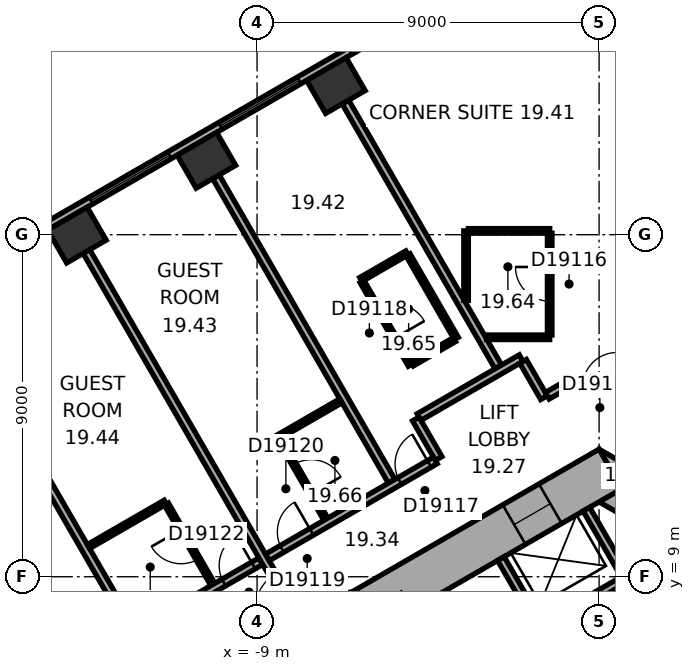
"""IFC4 building model, lengths in metres.
Left out: names, types, materials, properties, quantities, classifications, styles, units other than length and angle.
Written with IfcOpenShell. Run it as: python <this file> out.ifc"""

import sys

from ifc_helpers import new_model, si_unit, direction, frame, frame_2d, origin, origin_2d, place, context, subcontext, project, spatial, rectangle, extrude, element, fill, save


model = new_model("IFC4")
c1 = context("Model", 3, precision=1e-05, world=origin(), true_north=direction((0.0, 1.0)))
c2 = subcontext(c1, "Body", "Model", "MODEL_VIEW")
j1 = project(units=[si_unit("LENGTHUNIT", "METRE"), si_unit("PLANEANGLEUNIT", "RADIAN")], contexts=[c1])
p1 = place(None, origin())
s1 = spatial("IfcSite", under=j1, at=p1, CompositionType="ELEMENT")
p2 = place(p1, origin())
s2 = spatial("IfcBuilding", under=s1, at=p2, CompositionType="ELEMENT")
p3 = place(p2, frame((0.0, 0.0, 86.9)))
s3 = spatial("IfcBuildingStorey", under=s2, at=p3, CompositionType="ELEMENT", Elevation=86.9)
for number, where, z_axis, x_axis in (
    (1, (-6.926, 21.925, 0.0), (0.0, 0.0, 1.0), (-0.866, -0.5, 0.0)),
    (2, (-10.333, 19.957, 0.0), (0.0, 0.0, 1.0), (-0.866, -0.5, 0.0)),
    (3, (-13.74, 17.99, 0.0), (0.0, 0.0, 1.0), (-0.866, -0.5, 0.0)),
):
    element("IfcColumn", number, at=place(p3, frame(where, z_axis=z_axis, x_axis=x_axis)), inside=s3, PredefinedType="COLUMN", context=c2, shape_type="SweptSolid", body=[
        extrude(rectangle(XDim=1.2, YDim=1.0, at=origin_2d()), origin(), (0.0, 0.0, 1.0), 3.3),
    ])
p4 = place(p3, frame((10.4, 5.658, 0.0), z_axis=(0.0, 0.0, 1.0), x_axis=(-0.866021384402, 0.500006961711, 0.0)))
e4 = element("IfcWall", 4, at=p4, inside=s3, PredefinedType="SHEAR", context=c2, shape_type="SweptSolid", body=[
    extrude(rectangle(XDim=12.355, YDim=1.2, at=frame_2d((6.178, 0.0))), origin(), (0.0, 0.0, 1.0), 3.3),
])
p5 = place(p4, frame((2.728, 0.0, 0.0)))
e5 = element("IfcOpeningElement", 5, at=p5, cuts=e4, PredefinedType="OPENING", context=c2, shape_type="SweptSolid", body=[
    extrude(rectangle(XDim=1.1, YDim=2.1, at=frame_2d((0.55, 1.05))), frame((0.0, 0.61, 0.0), z_axis=(0.0, -1.0, 0.0), x_axis=(1.0, 0.0, 0.0)), (0.0, 0.0, 1.0), 1.22),
])
p6 = place(p4, frame((5.328, 0.0, 0.0)))
e6 = element("IfcOpeningElement", 6, at=p6, cuts=e4, PredefinedType="OPENING", context=c2, shape_type="SweptSolid", body=[
    extrude(rectangle(XDim=1.1, YDim=2.1, at=frame_2d((0.55, 1.05))), frame((0.0, 0.61, 0.0), z_axis=(0.0, -1.0, 0.0), x_axis=(1.0, 0.0, 0.0)), (0.0, 0.0, 1.0), 1.22),
])
p7 = place(p4, frame((7.928, 0.0, 0.0)))
e7 = element("IfcOpeningElement", 7, at=p7, cuts=e4, PredefinedType="OPENING", context=c2, shape_type="SweptSolid", body=[
    extrude(rectangle(XDim=1.1, YDim=2.1, at=frame_2d((0.55, 1.05))), frame((0.0, 0.61, 0.0), z_axis=(0.0, -1.0, 0.0), x_axis=(1.0, 0.0, 0.0)), (0.0, 0.0, 1.0), 1.22),
])
p8 = place(p3, frame((0.3, 11.836, 0.0), z_axis=(0.0, 0.0, 1.0), x_axis=(-0.866021384402, -0.500006961711, 0.0)))
e8 = element("IfcWall", 8, at=p8, inside=s3, PredefinedType="SHEAR", context=c2, shape_type="SweptSolid", body=[
    extrude(rectangle(XDim=12.355, YDim=1.2, at=frame_2d((6.178, 0.0))), origin(), (0.0, 0.0, 1.0), 3.3),
])
p9 = place(p8, frame((6.378, 0.0, 0.0)))
e9 = element("IfcOpeningElement", 9, at=p9, cuts=e8, PredefinedType="OPENING", context=c2, shape_type="SweptSolid", body=[
    extrude(rectangle(XDim=1.5, YDim=2.1, at=frame_2d((0.75, 1.05))), frame((0.0, 0.61, 0.0), z_axis=(0.0, -1.0, 0.0), x_axis=(1.0, 0.0, 0.0)), (0.0, 0.0, 1.0), 1.22),
])
p10 = place(p8, frame((1.828, 0.0, 0.0)))
e10 = element("IfcOpeningElement", 10, at=p10, cuts=e8, PredefinedType="OPENING", context=c2, shape_type="SweptSolid", body=[
    extrude(rectangle(XDim=1.1, YDim=2.1, at=frame_2d((0.55, 1.05))), frame((0.0, 0.61, 0.0), z_axis=(0.0, -1.0, 0.0), x_axis=(1.0, 0.0, 0.0)), (0.0, 0.0, 1.0), 1.22),
])
p11 = place(p3, frame((-3.136, 24.805, 0.0), z_axis=(0.0, 0.0, 1.0), x_axis=(-0.866028291626, -0.499994998079, 0.0)))
e11 = element("IfcWall", 11, at=p11, inside=s3, PredefinedType="STANDARD", context=c2, shape_type="SweptSolid", body=[
    extrude(rectangle(XDim=21.246, YDim=0.2, at=frame_2d((10.623, 0.0))), origin(), (0.0, 0.0, 1.0), 3.3),
])
p12 = place(p11, frame((1.555, 0.0, 0.8)))
e12 = element("IfcOpeningElement", 12, at=p12, cuts=e11, PredefinedType="OPENING", context=c2, shape_type="SweptSolid", body=[
    extrude(rectangle(XDim=2.4, YDim=1.7, at=frame_2d((1.2, 0.85))), frame((0.0, 0.11, 0.0), z_axis=(0.0, -1.0, 0.0), x_axis=(1.0, 0.0, 0.0)), (0.0, 0.0, 1.0), 0.22),
])
p13 = place(p11, frame((5.489, 0.0, 0.8)))
e13 = element("IfcOpeningElement", 13, at=p13, cuts=e11, PredefinedType="OPENING", context=c2, shape_type="SweptSolid", body=[
    extrude(rectangle(XDim=2.4, YDim=1.7, at=frame_2d((1.2, 0.85))), frame((0.0, 0.11, 0.0), z_axis=(0.0, -1.0, 0.0), x_axis=(1.0, 0.0, 0.0)), (0.0, 0.0, 1.0), 0.22),
])
p14 = place(p11, frame((9.424, 0.0, 0.8)))
e14 = element("IfcOpeningElement", 14, at=p14, cuts=e11, PredefinedType="OPENING", context=c2, shape_type="SweptSolid", body=[
    extrude(rectangle(XDim=2.4, YDim=1.7, at=frame_2d((1.2, 0.85))), frame((0.0, 0.11, 0.0), z_axis=(0.0, -1.0, 0.0), x_axis=(1.0, 0.0, 0.0)), (0.0, 0.0, 1.0), 0.22),
])
p15 = place(p11, frame((13.358, 0.0, 0.8)))
e15 = element("IfcOpeningElement", 15, at=p15, cuts=e11, PredefinedType="OPENING", context=c2, shape_type="SweptSolid", body=[
    extrude(rectangle(XDim=2.4, YDim=1.7, at=frame_2d((1.2, 0.85))), frame((0.0, 0.11, 0.0), z_axis=(0.0, -1.0, 0.0), x_axis=(1.0, 0.0, 0.0)), (0.0, 0.0, 1.0), 0.22),
])
p16 = place(p11, frame((17.293, 0.0, 0.8)))
e16 = element("IfcOpeningElement", 16, at=p16, cuts=e11, PredefinedType="OPENING", context=c2, shape_type="SweptSolid", body=[
    extrude(rectangle(XDim=2.4, YDim=1.7, at=frame_2d((1.2, 0.85))), frame((0.0, 0.11, 0.0), z_axis=(0.0, -1.0, 0.0), x_axis=(1.0, 0.0, 0.0)), (0.0, 0.0, 1.0), 0.22),
])
p17 = place(p3, frame((0.803, 9.009, 0.0), z_axis=(0.0, 0.0, 1.0), x_axis=(-0.866028230842, -0.499995103361, 0.0)))
e17 = element("IfcWall", 17, at=p17, inside=s3, PredefinedType="PARTITIONING", context=c2, shape_type="SweptSolid", body=[
    extrude(rectangle(XDim=5.4, YDim=0.2, at=frame_2d((2.7, 0.0))), origin(), (0.0, 0.0, 1.0), 3.05),
])
p18 = place(p3, frame((0.767, 8.872, 0.0), z_axis=(0.0, 0.0, 1.0), x_axis=(-0.499994660107, 0.866028486751, 0.0)))
e18 = element("IfcWall", 18, at=p18, inside=s3, PredefinedType="PARTITIONING", context=c2, shape_type="SweptSolid", body=[
    extrude(rectangle(XDim=2.2, YDim=0.2, at=frame_2d((1.1, 0.0))), origin(), (0.0, 0.0, 1.0), 3.05),
])
p19 = place(p3, frame((-1.485, 7.572, 0.0), z_axis=(0.0, 0.0, 1.0), x_axis=(-0.50002983664, 0.866008176907, 0.0)))
e19 = element("IfcWall", 19, at=p19, inside=s3, PredefinedType="PARTITIONING", context=c2, shape_type="SweptSolid", body=[
    extrude(rectangle(XDim=2.2, YDim=0.2, at=frame_2d((1.1, 0.0))), origin(), (0.0, 0.0, 1.0), 3.05),
])
p20 = place(p3, frame((-16.898, 15.59, 0.0), z_axis=(0.0, 0.0, 1.0), x_axis=(0.499994742786, -0.866028439017, 0.0)))
e20 = element("IfcWall", 20, at=p20, inside=s3, PredefinedType="PARTITIONING", context=c2, shape_type="SweptSolid", body=[
    extrude(rectangle(XDim=9.65, YDim=0.2, at=frame_2d((4.825, 0.0))), origin(), (0.0, 0.0, 1.0), 3.05),
])
p21 = place(p3, frame((-13.436, 9.794, 0.0), z_axis=(0.0, 0.0, 1.0), x_axis=(0.866053246676, 0.499951771596, 0.0)))
e21 = element("IfcWall", 21, at=p21, inside=s3, PredefinedType="PARTITIONING", context=c2, shape_type="SweptSolid", body=[
    extrude(rectangle(XDim=2.335, YDim=0.12, at=frame_2d((1.167, 0.0))), origin(), (0.0, 0.0, 1.0), 3.05),
])
p22 = place(p3, frame((-11.385, 10.909, 0.0), z_axis=(0.0, 0.0, 1.0), x_axis=(0.500077547548, -0.865980627057, 0.0)))
e22 = element("IfcWall", 22, at=p22, inside=s3, PredefinedType="PARTITIONING", context=c2, shape_type="SweptSolid", body=[
    extrude(rectangle(XDim=2.44, YDim=0.12, at=frame_2d((1.22, 0.0))), origin(), (0.0, 0.0, 1.0), 3.05),
])
p23 = place(p22, frame((0.77, 0.0, 0.0)))
e23 = element("IfcOpeningElement", 23, at=p23, cuts=e22, PredefinedType="OPENING", context=c2, shape_type="SweptSolid", body=[
    extrude(rectangle(XDim=0.9, YDim=2.1, at=frame_2d((0.45, 1.05))), frame((0.0, 0.07, 0.0), z_axis=(0.0, -1.0, 0.0), x_axis=(1.0, 0.0, 0.0)), (0.0, 0.0, 1.0), 0.14),
])
p24 = place(p3, frame((-10.083, 19.524, 0.0), z_axis=(0.0, 0.0, 1.0), x_axis=(0.499999662836, -0.866025598446, 0.0)))
e24 = element("IfcWall", 24, at=p24, inside=s3, PredefinedType="PARTITIONING", context=c2, shape_type="SweptSolid", body=[
    extrude(rectangle(XDim=9.25, YDim=0.2, at=frame_2d((4.625, 0.0))), origin(), (0.0, 0.0, 1.0), 2.6),
])
p25 = place(p3, frame((-8.902, 9.41, 0.0), z_axis=(0.0, 0.0, 1.0), x_axis=(-0.866014299198, -0.500019233215, 0.0)))
e25 = element("IfcWall", 25, at=p25, inside=s3, PredefinedType="PARTITIONING", context=c2, shape_type="SweptSolid", body=[
    extrude(rectangle(XDim=3.133, YDim=0.2, at=frame_2d((1.567, 0.0))), origin(), (0.0, 0.0, 1.0), 3.05),
])
p26 = place(p25, frame((0.225, 0.0, 0.0)))
e26 = element("IfcOpeningElement", 26, at=p26, cuts=e25, PredefinedType="OPENING", context=c2, shape_type="SweptSolid", body=[
    extrude(rectangle(XDim=0.9, YDim=2.1, at=frame_2d((0.45, 1.05))), frame((0.0, 0.11, 0.0), z_axis=(0.0, -1.0, 0.0), x_axis=(1.0, 0.0, 0.0)), (0.0, 0.0, 1.0), 0.22),
])
p27 = place(p3, frame((-8.44, 12.679, 0.0), z_axis=(0.0, 0.0, 1.0), x_axis=(0.866044365799, 0.499967155389, 0.0)))
e27 = element("IfcWall", 27, at=p27, inside=s3, PredefinedType="PARTITIONING", context=c2, shape_type="SweptSolid", body=[
    extrude(rectangle(XDim=1.9, YDim=0.12, at=frame_2d((0.95, 0.0))), origin(), (0.0, 0.0, 1.0), 3.05),
])
p28 = place(p3, frame((-7.865, 7.814, 0.0), z_axis=(0.0, 0.0, 1.0), x_axis=(-0.500004234368, 0.866022959057, 0.0)))
e28 = element("IfcWall", 28, at=p28, inside=s3, PredefinedType="PARTITIONING", context=c2, shape_type="SweptSolid", body=[
    extrude(rectangle(XDim=11.25, YDim=0.2, at=frame_2d((5.625, 0.0))), origin(), (0.0, 0.0, 1.0), 3.05),
])
p29 = place(p28, frame((0.5, 0.0, 0.0)))
e29 = element("IfcOpeningElement", 29, at=p29, cuts=e28, PredefinedType="OPENING", context=c2, shape_type="SweptSolid", body=[
    extrude(rectangle(XDim=0.9, YDim=2.1, at=frame_2d((0.45, 1.05))), frame((0.0, 0.11, 0.0), z_axis=(0.0, -1.0, 0.0), x_axis=(1.0, 0.0, 0.0)), (0.0, 0.0, 1.0), 0.22),
])
p30 = place(p3, frame((-7.19, 10.513, 0.0), z_axis=(0.0, 0.0, 1.0), x_axis=(-0.499959183527, 0.866048967903, 0.0)))
e30 = element("IfcWall", 30, at=p30, inside=s3, PredefinedType="PARTITIONING", context=c2, shape_type="SweptSolid", body=[
    extrude(rectangle(XDim=2.44, YDim=0.12, at=frame_2d((1.22, 0.0))), origin(), (0.0, 0.0, 1.0), 3.05),
])
p31 = place(p30, frame((0.77, 0.0, 0.0)))
e31 = element("IfcOpeningElement", 31, at=p31, cuts=e30, PredefinedType="OPENING", context=c2, shape_type="SweptSolid", body=[
    extrude(rectangle(XDim=0.9, YDim=2.1, at=frame_2d((0.45, 1.05))), frame((0.0, 0.07, 0.0), z_axis=(0.0, -1.0, 0.0), x_axis=(1.0, 0.0, 0.0)), (0.0, 0.0, 1.0), 0.14),
])
p32 = place(p3, frame((-6.676, 21.492, 0.0), z_axis=(0.0, 0.0, 1.0), x_axis=(0.500011263043, -0.866018900966, 0.0)))
e32 = element("IfcWall", 32, at=p32, inside=s3, PredefinedType="PARTITIONING", context=c2, shape_type="SweptSolid", body=[
    extrude(rectangle(XDim=8.049, YDim=0.2, at=frame_2d((4.024, 0.0))), origin(), (0.0, 0.0, 1.0), 3.05),
])
p33 = place(p3, frame((-6.268, 16.82, 0.0), z_axis=(0.0, 0.0, 1.0), x_axis=(0.866002662425, 0.500039387122, 0.0)))
e33 = element("IfcWall", 33, at=p33, inside=s3, PredefinedType="PARTITIONING", context=c2, shape_type="SweptSolid", body=[
    extrude(rectangle(XDim=1.4, YDim=0.12, at=frame_2d((0.7, 0.0))), origin(), (0.0, 0.0, 1.0), 3.05),
])
p34 = place(p3, frame((-5.026, 17.469, 0.0), z_axis=(0.0, 0.0, 1.0), x_axis=(0.500005339912, -0.866022320763, 0.0)))
e34 = element("IfcWall", 34, at=p34, inside=s3, PredefinedType="PARTITIONING", context=c2, shape_type="SweptSolid", body=[
    extrude(rectangle(XDim=2.54, YDim=0.12, at=frame_2d((1.27, 0.0))), origin(), (0.0, 0.0, 1.0), 3.05),
])
p35 = place(p3, frame((-4.968, 14.569, 0.0), z_axis=(0.0, 0.0, 1.0), x_axis=(-0.500046963369, 0.865998287773, 0.0)))
e35 = element("IfcWall", 35, at=p35, inside=s3, PredefinedType="PARTITIONING", context=c2, shape_type="SweptSolid", body=[
    extrude(rectangle(XDim=2.54, YDim=0.12, at=frame_2d((1.27, 0.0))), origin(), (0.0, 0.0, 1.0), 3.05),
])
p36 = place(p35, frame((0.82, 0.0, 0.0)))
e36 = element("IfcOpeningElement", 36, at=p36, cuts=e35, PredefinedType="OPENING", context=c2, shape_type="SweptSolid", body=[
    extrude(rectangle(XDim=0.9, YDim=2.1, at=frame_2d((0.45, 1.05))), frame((0.0, 0.07, 0.0), z_axis=(0.0, -1.0, 0.0), x_axis=(1.0, 0.0, 0.0)), (0.0, 0.0, 1.0), 0.14),
])
p37 = place(p3, frame((-4.823, 13.152, 0.0), z_axis=(0.0, 0.0, 1.0), x_axis=(0.499986357472, -0.866033280158, 0.0)))
e37 = element("IfcWall", 37, at=p37, inside=s3, PredefinedType="PARTITIONING", context=c2, shape_type="SweptSolid", body=[
    extrude(rectangle(XDim=1.201, YDim=0.2, at=frame_2d((0.601, 0.0))), origin(), (0.0, 0.0, 1.0), 3.05),
])
p38 = place(p3, frame((-4.309, 12.061, 0.0), z_axis=(0.0, 0.0, 1.0), x_axis=(-0.866020679205, -0.500008183122, 0.0)))
e38 = element("IfcWall", 38, at=p38, inside=s3, PredefinedType="PARTITIONING", context=c2, shape_type="SweptSolid", body=[
    extrude(rectangle(XDim=5.104, YDim=0.2, at=frame_2d((2.552, 0.0))), origin(), (0.0, 0.0, 1.0), 3.05),
])
p39 = place(p38, frame((0.185, 0.0, 0.0)))
e39 = element("IfcOpeningElement", 39, at=p39, cuts=e38, PredefinedType="OPENING", context=c2, shape_type="SweptSolid", body=[
    extrude(rectangle(XDim=0.9, YDim=2.1, at=frame_2d((0.45, 1.05))), frame((0.0, 0.11, 0.0), z_axis=(0.0, -1.0, 0.0), x_axis=(1.0, 0.0, 0.0)), (0.0, 0.0, 1.0), 0.22),
])
p40 = place(p38, frame((3.761, 0.0, 0.0)))
e40 = element("IfcOpeningElement", 40, at=p40, cuts=e38, PredefinedType="OPENING", context=c2, shape_type="SweptSolid", body=[
    extrude(rectangle(XDim=0.9, YDim=2.1, at=frame_2d((0.45, 1.05))), frame((0.0, 0.11, 0.0), z_axis=(0.0, -1.0, 0.0), x_axis=(1.0, 0.0, 0.0)), (0.0, 0.0, 1.0), 0.22),
])
p41 = place(p3, frame((-3.808, 15.239, 0.0), z_axis=(0.0, 0.0, 1.0), x_axis=(-0.866087136806, -0.499893060024, 0.0)))
e41 = element("IfcWall", 41, at=p41, inside=s3, PredefinedType="PARTITIONING", context=c2, shape_type="SweptSolid", body=[
    extrude(rectangle(XDim=1.28, YDim=0.12, at=frame_2d((0.64, 0.0))), origin(), (0.0, 0.0, 1.0), 3.05),
])
p42 = place(p3, frame((-3.5, 16.271, 0.0), z_axis=(0.0, 0.0, 1.0), x_axis=(0.0, 1.0, 0.0)))
e42 = element("IfcWall", 42, at=p42, inside=s3, PredefinedType="PARTITIONING", context=c2, shape_type="SweptSolid", body=[
    extrude(rectangle(XDim=1.829, YDim=0.12, at=frame_2d((0.915, 0.0))), origin(), (0.0, 0.0, 1.0), 3.05),
])
p43 = place(p3, frame((-3.44, 18.101, 0.0), z_axis=(0.0, 0.0, 1.0), x_axis=(1.0, 0.0, 0.0)))
e43 = element("IfcWall", 43, at=p43, inside=s3, PredefinedType="PARTITIONING", context=c2, shape_type="SweptSolid", body=[
    extrude(rectangle(XDim=2.14, YDim=0.12, at=frame_2d((1.07, 0.0))), origin(), (0.0, 0.0, 1.0), 3.05),
])
p44 = place(p3, frame((-2.05, 14.752, 0.0), z_axis=(0.0, 0.0, 1.0), x_axis=(-0.866030936828, -0.499990416364, 0.0)))
e44 = element("IfcWall", 44, at=p44, inside=s3, PredefinedType="PARTITIONING", context=c2, shape_type="SweptSolid", body=[
    extrude(rectangle(XDim=3.102, YDim=0.2, at=frame_2d((1.551, 0.0))), origin(), (0.0, 0.0, 1.0), 3.05),
])
p45 = place(p3, frame((-1.449, 13.712, 0.0), z_axis=(0.0, 0.0, 1.0), x_axis=(-0.499978356969, 0.866037899034, 0.0)))
e45 = element("IfcWall", 45, at=p45, inside=s3, PredefinedType="PARTITIONING", context=c2, shape_type="SweptSolid", body=[
    extrude(rectangle(XDim=1.101, YDim=0.2, at=frame_2d((0.551, 0.0))), origin(), (0.0, 0.0, 1.0), 3.05),
])
p46 = place(p3, frame((-1.3, 15.301, 0.0), z_axis=(0.0, 0.0, 1.0), x_axis=(-1.0, 0.0, 0.0)))
e46 = element("IfcWall", 46, at=p46, inside=s3, PredefinedType="PARTITIONING", context=c2, shape_type="SweptSolid", body=[
    extrude(rectangle(XDim=1.661, YDim=0.12, at=frame_2d((0.831, 0.0))), origin(), (0.0, 0.0, 1.0), 3.05),
])
p47 = place(p3, frame((-1.3, 18.041, 0.0), z_axis=(0.0, 0.0, 1.0), x_axis=(0.0, -1.0, 0.0)))
e47 = element("IfcWall", 47, at=p47, inside=s3, PredefinedType="PARTITIONING", context=c2, shape_type="SweptSolid", body=[
    extrude(rectangle(XDim=2.68, YDim=0.12, at=frame_2d((1.34, 0.0))), origin(), (0.0, 0.0, 1.0), 3.05),
])
p48 = place(p47, frame((0.89, 0.0, 0.0)))
e48 = element("IfcOpeningElement", 48, at=p48, cuts=e47, PredefinedType="OPENING", context=c2, shape_type="SweptSolid", body=[
    extrude(rectangle(XDim=0.9, YDim=2.1, at=frame_2d((0.45, 1.05))), frame((0.0, 0.07, 0.0), z_axis=(0.0, -1.0, 0.0), x_axis=(1.0, 0.0, 0.0)), (0.0, 0.0, 1.0), 0.14),
])
p49 = place(p3, frame((-0.95, 14.001, 0.0), z_axis=(0.0, 0.0, 1.0), x_axis=(-0.86609177584, -0.499885022602, 0.0)))
e49 = element("IfcWall", 49, at=p49, inside=s3, PredefinedType="PARTITIONING", context=c2, shape_type="SweptSolid", body=[
    extrude(rectangle(XDim=0.477, YDim=0.2, at=frame_2d((0.238, 0.0))), origin(), (0.0, 0.0, 1.0), 3.05),
])
p50 = place(p3, frame((0.95, 14.001, 0.0), z_axis=(0.0, 0.0, 1.0), x_axis=(-1.0, 0.0, 0.0)))
e50 = element("IfcWall", 50, at=p50, inside=s3, PredefinedType="PARTITIONING", context=c2, shape_type="SweptSolid", body=[
    extrude(rectangle(XDim=1.86, YDim=0.2, at=frame_2d((0.93, 0.0))), origin(), (0.0, 0.0, 1.0), 3.05),
])
p51 = place(p50, frame((0.48, 0.0, 0.0)))
e51 = element("IfcOpeningElement", 51, at=p51, cuts=e50, PredefinedType="OPENING", context=c2, shape_type="SweptSolid", body=[
    extrude(rectangle(XDim=0.9, YDim=2.1, at=frame_2d((0.45, 1.05))), frame((0.0, 0.11, 0.0), z_axis=(0.0, -1.0, 0.0), x_axis=(1.0, 0.0, 0.0)), (0.0, 0.0, 1.0), 0.22),
])
p52 = place(p13, origin())
e52 = element("IfcWindow", 52, at=p52, inside=s3, PartitioningType="SINGLE_PANEL", PredefinedType="WINDOW", context=c2, shape_type="SweptSolid", body=[
    extrude(rectangle(XDim=2.4, YDim=1.7, at=frame_2d((1.2, 0.85))), frame((0.0, 0.03, 0.0), z_axis=(0.0, -1.0, 0.0), x_axis=(1.0, 0.0, 0.0)), (0.0, 0.0, 1.0), 0.06),
])
fill(e13, e52)
p53 = place(p14, origin())
e53 = element("IfcWindow", 53, at=p53, inside=s3, PartitioningType="SINGLE_PANEL", PredefinedType="WINDOW", context=c2, shape_type="SweptSolid", body=[
    extrude(rectangle(XDim=2.4, YDim=1.7, at=frame_2d((1.2, 0.85))), frame((0.0, 0.03, 0.0), z_axis=(0.0, -1.0, 0.0), x_axis=(1.0, 0.0, 0.0)), (0.0, 0.0, 1.0), 0.06),
])
fill(e14, e53)
p54 = place(p9, origin())
e54 = element("IfcDoor", 54, at=p54, inside=s3, OperationType="DOUBLE_DOOR_SINGLE_SWING", PredefinedType="DOOR", context=c2, shape_type="SweptSolid", body=[
    extrude(rectangle(XDim=1.5, YDim=2.1, at=frame_2d((0.75, 1.05))), frame((0.0, 0.025, 0.0), z_axis=(0.0, -1.0, 0.0), x_axis=(1.0, 0.0, 0.0)), (0.0, 0.0, 1.0), 0.05),
])
fill(e9, e54)
p55 = place(p10, origin())
e55 = element("IfcDoor", 55, at=p55, inside=s3, OperationType="DOUBLE_DOOR_SLIDING", PredefinedType="DOOR", context=c2, shape_type="SweptSolid", body=[
    extrude(rectangle(XDim=1.1, YDim=2.1, at=frame_2d((0.55, 1.05))), frame((0.0, 0.025, 0.0), z_axis=(0.0, -1.0, 0.0), x_axis=(1.0, 0.0, 0.0)), (0.0, 0.0, 1.0), 0.05),
])
fill(e10, e55)
p56 = place(p51, origin())
e56 = element("IfcDoor", 56, at=p56, inside=s3, OperationType="SINGLE_SWING_LEFT", PredefinedType="DOOR", context=c2, shape_type="SweptSolid", body=[
    extrude(rectangle(XDim=0.9, YDim=2.1, at=frame_2d((0.45, 1.05))), frame((0.0, 0.025, 0.0), z_axis=(0.0, -1.0, 0.0), x_axis=(1.0, 0.0, 0.0)), (0.0, 0.0, 1.0), 0.05),
])
fill(e51, e56)
p57 = place(p48, origin())
e57 = element("IfcDoor", 57, at=p57, inside=s3, OperationType="SINGLE_SWING_LEFT", PredefinedType="DOOR", context=c2, shape_type="SweptSolid", body=[
    extrude(rectangle(XDim=0.9, YDim=2.1, at=frame_2d((0.45, 1.05))), frame((0.0, 0.025, 0.0), z_axis=(0.0, -1.0, 0.0), x_axis=(1.0, 0.0, 0.0)), (0.0, 0.0, 1.0), 0.05),
])
fill(e48, e57)
p58 = place(p39, origin())
e58 = element("IfcDoor", 58, at=p58, inside=s3, OperationType="SINGLE_SWING_LEFT", PredefinedType="DOOR", context=c2, shape_type="SweptSolid", body=[
    extrude(rectangle(XDim=0.9, YDim=2.1, at=frame_2d((0.45, 1.05))), frame((0.0, 0.025, 0.0), z_axis=(0.0, -1.0, 0.0), x_axis=(1.0, 0.0, 0.0)), (0.0, 0.0, 1.0), 0.05),
])
fill(e39, e58)
p59 = place(p36, origin())
e59 = element("IfcDoor", 59, at=p59, inside=s3, OperationType="SINGLE_SWING_LEFT", PredefinedType="DOOR", context=c2, shape_type="SweptSolid", body=[
    extrude(rectangle(XDim=0.9, YDim=2.1, at=frame_2d((0.45, 1.05))), frame((0.0, 0.025, 0.0), z_axis=(0.0, -1.0, 0.0), x_axis=(1.0, 0.0, 0.0)), (0.0, 0.0, 1.0), 0.05),
])
fill(e36, e59)
p60 = place(p40, origin())
e60 = element("IfcDoor", 60, at=p60, inside=s3, OperationType="SINGLE_SWING_LEFT", PredefinedType="DOOR", context=c2, shape_type="SweptSolid", body=[
    extrude(rectangle(XDim=0.9, YDim=2.1, at=frame_2d((0.45, 1.05))), frame((0.0, 0.025, 0.0), z_axis=(0.0, -1.0, 0.0), x_axis=(1.0, 0.0, 0.0)), (0.0, 0.0, 1.0), 0.05),
])
fill(e40, e60)
p61 = place(p31, origin())
e61 = element("IfcDoor", 61, at=p61, inside=s3, OperationType="SINGLE_SWING_LEFT", PredefinedType="DOOR", context=c2, shape_type="SweptSolid", body=[
    extrude(rectangle(XDim=0.9, YDim=2.1, at=frame_2d((0.45, 1.05))), frame((0.0, 0.025, 0.0), z_axis=(0.0, -1.0, 0.0), x_axis=(1.0, 0.0, 0.0)), (0.0, 0.0, 1.0), 0.05),
])
fill(e31, e61)
p62 = place(p26, origin())
e62 = element("IfcDoor", 62, at=p62, inside=s3, OperationType="SINGLE_SWING_LEFT", PredefinedType="DOOR", context=c2, shape_type="SweptSolid", body=[
    extrude(rectangle(XDim=0.9, YDim=2.1, at=frame_2d((0.45, 1.05))), frame((0.0, 0.025, 0.0), z_axis=(0.0, -1.0, 0.0), x_axis=(1.0, 0.0, 0.0)), (0.0, 0.0, 1.0), 0.05),
])
fill(e26, e62)
p63 = place(p23, origin())
e63 = element("IfcDoor", 63, at=p63, inside=s3, OperationType="SINGLE_SWING_LEFT", PredefinedType="DOOR", context=c2, shape_type="SweptSolid", body=[
    extrude(rectangle(XDim=0.9, YDim=2.1, at=frame_2d((0.45, 1.05))), frame((0.0, 0.025, 0.0), z_axis=(0.0, -1.0, 0.0), x_axis=(1.0, 0.0, 0.0)), (0.0, 0.0, 1.0), 0.05),
])
fill(e23, e63)
p64 = place(p29, origin())
e64 = element("IfcDoor", 64, at=p64, inside=s3, OperationType="SINGLE_SWING_LEFT", PredefinedType="DOOR", context=c2, shape_type="SweptSolid", body=[
    extrude(rectangle(XDim=0.9, YDim=2.1, at=frame_2d((0.45, 1.05))), frame((0.0, 0.025, 0.0), z_axis=(0.0, -1.0, 0.0), x_axis=(1.0, 0.0, 0.0)), (0.0, 0.0, 1.0), 0.05),
])
fill(e29, e64)
save(model, sys.argv[1])
